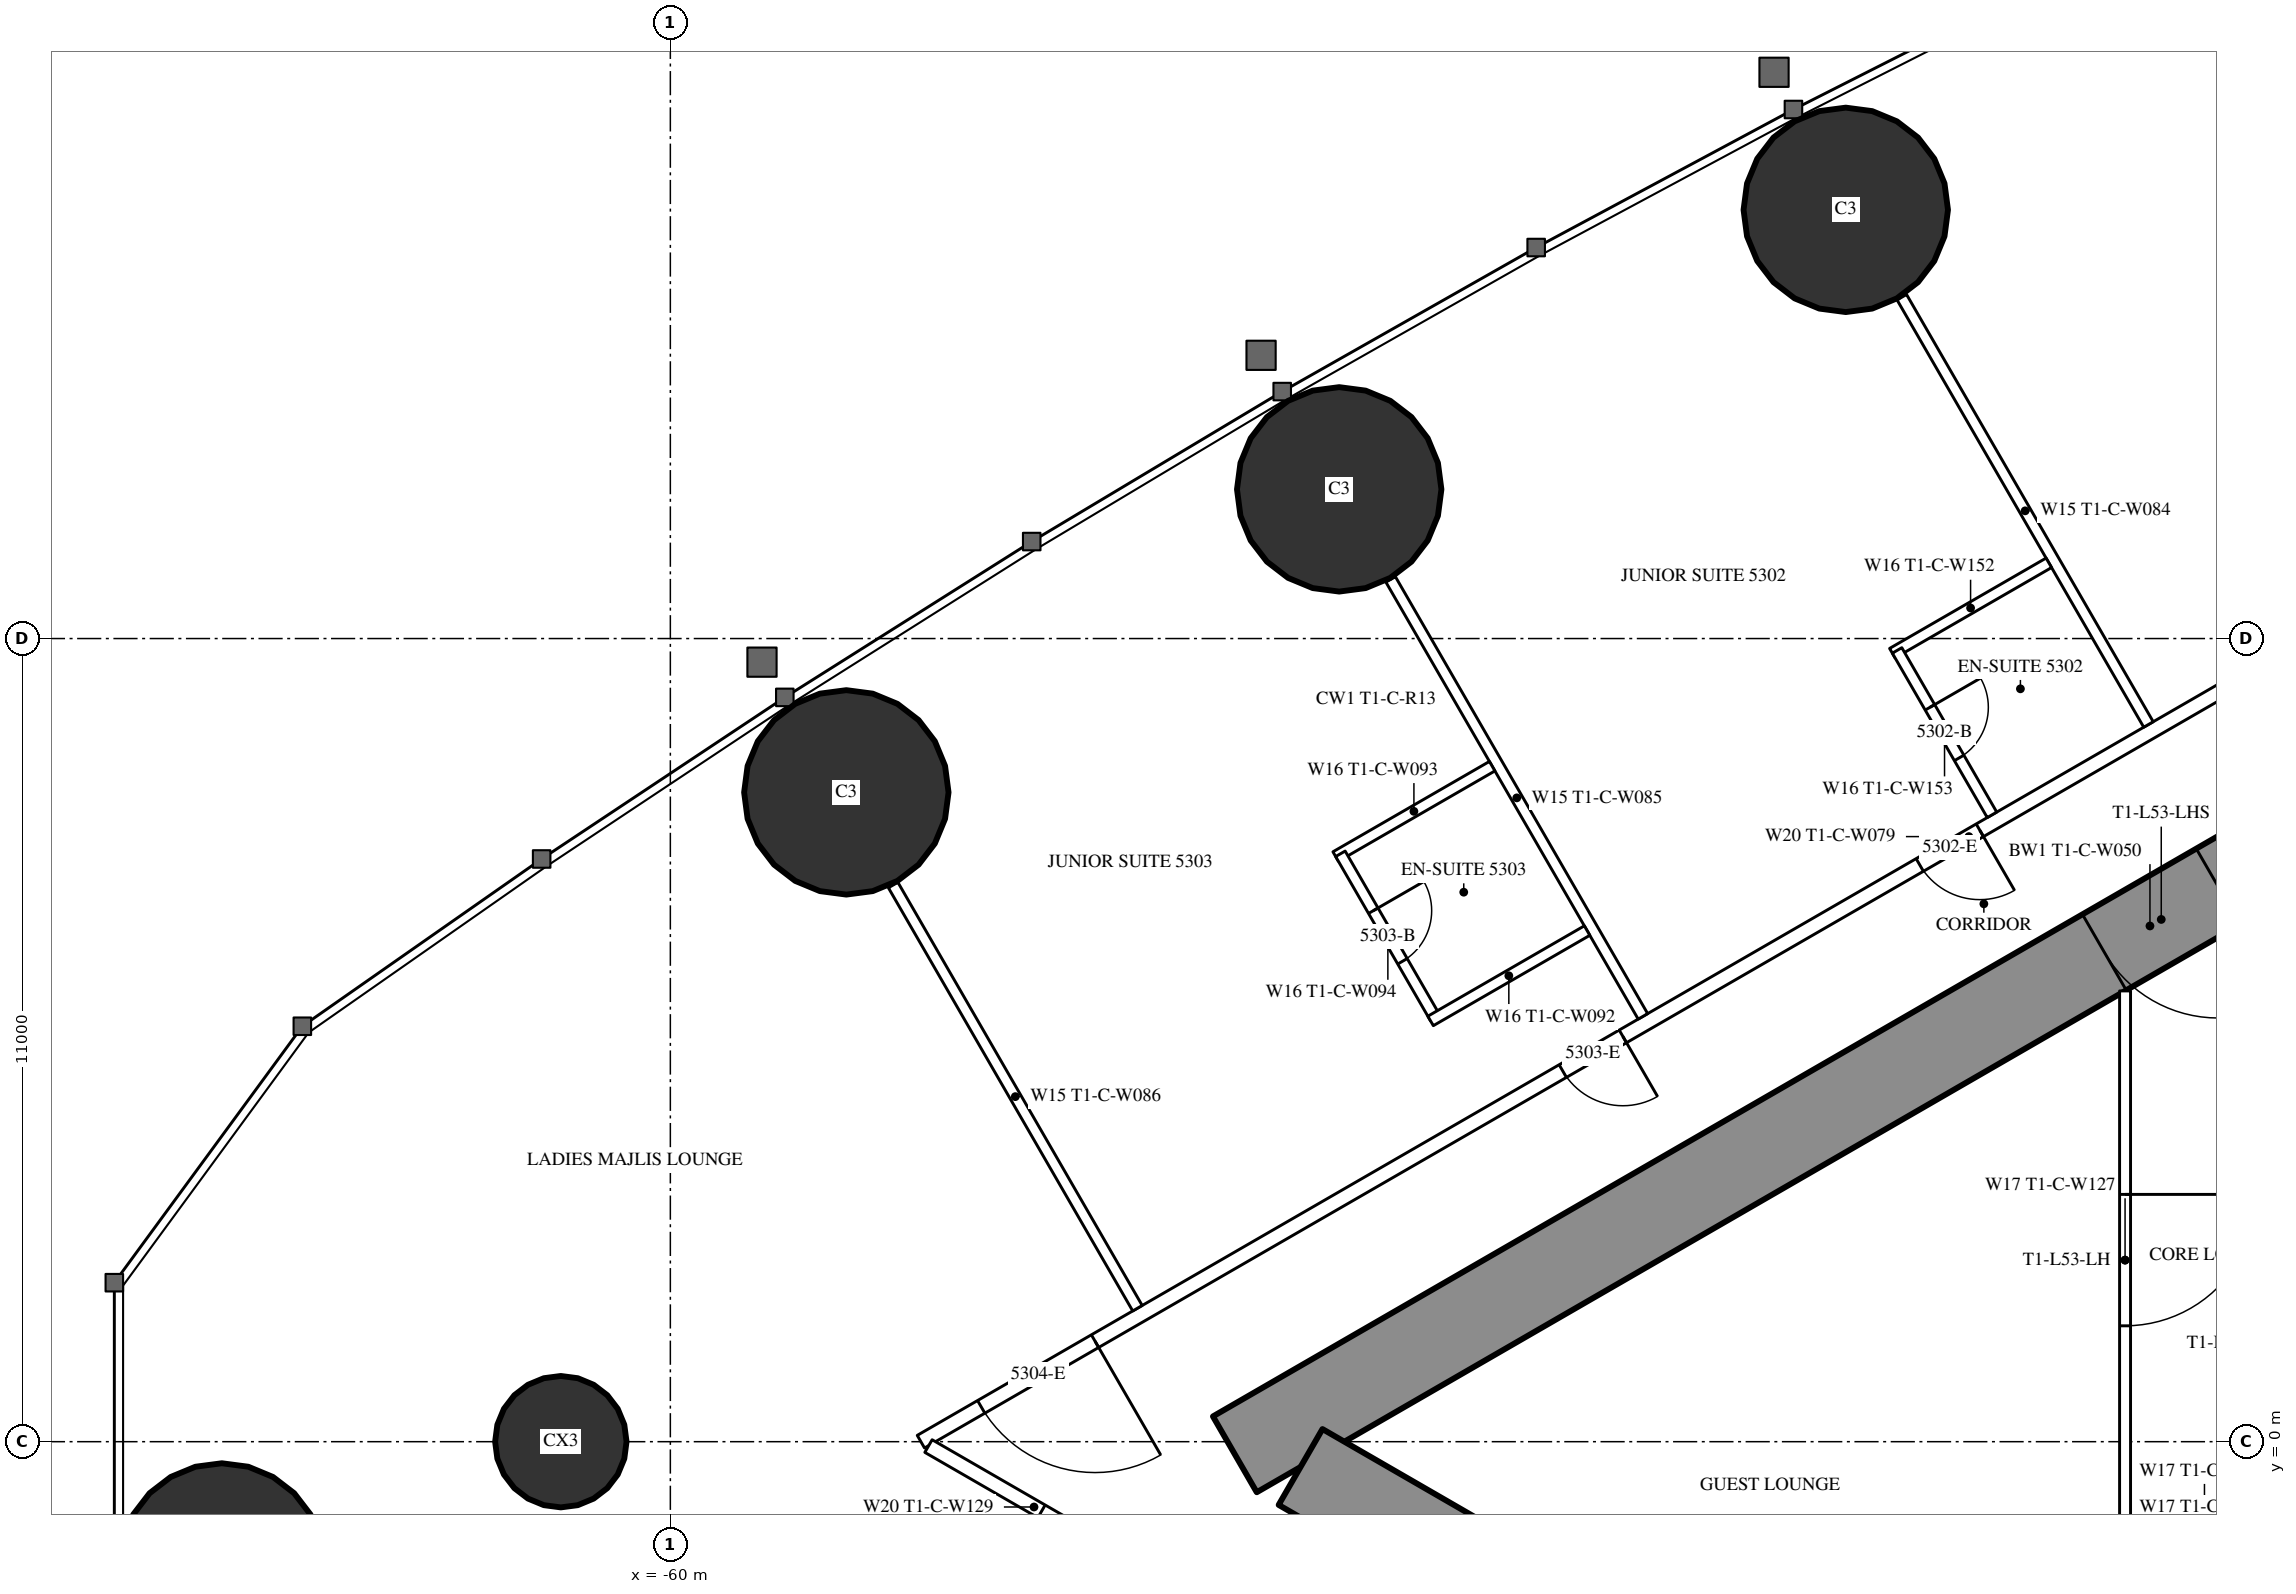
"""IFC4 building model, lengths in metres.
Left out: names, types, materials, properties, quantities, classifications, styles, units other than length and angle.
Written with IfcOpenShell. Run it as: python <this file> out.ifc"""

import sys

from ifc_helpers import new_model, si_unit, direction, frame, frame_2d, origin, origin_2d, place, context, subcontext, project, spatial, rectangle, circle, extrude, element, fill, save


model = new_model("IFC4")
c1 = context("Model", 3, precision=1e-05, world=origin(), true_north=direction((0.0, 1.0)))
c2 = subcontext(c1, "Body", "Model", "MODEL_VIEW")
j1 = project(units=[si_unit("LENGTHUNIT", "METRE"), si_unit("PLANEANGLEUNIT", "RADIAN")], contexts=[c1])
p1 = place(None, origin())
s1 = spatial("IfcSite", under=j1, at=p1, CompositionType="ELEMENT")
p2 = place(p1, origin())
s2 = spatial("IfcBuilding", under=s1, at=p2, CompositionType="ELEMENT")
p3 = place(p2, frame((0.0, 0.0, 198.3)))
s3 = spatial("IfcBuildingStorey", under=s2, at=p3, CompositionType="ELEMENT", Elevation=198.3)
for number, where, z_axis, x_axis in (
    (1, (-66.143, -1.695, 0.0), (0.0, 0.0, 1.0), (1.0, 0.0, 0.0)),
    (2, (-43.9, 16.871, 0.0), (0.0, 0.0, 1.0), (1.0, 0.0, 0.0)),
    (3, (-50.839, 13.043, 0.0), (0.0, 0.0, 1.0), (1.0, 0.0, 0.0)),
    (4, (-57.59, 8.893, 0.0), (0.0, 0.0, 1.0), (1.0, 0.0, 0.0)),
):
    element("IfcColumn", number, at=place(p3, frame(where, z_axis=z_axis, x_axis=x_axis)), inside=s3, PredefinedType="COLUMN", context=c2, shape_type="SweptSolid", body=[
        extrude(circle(Radius=1.4, at=origin_2d()), origin(), (0.0, 0.0, 1.0), 3.5),
    ])
p4 = place(p3, frame((-61.5, 0.0, 0.0), z_axis=(0.0, 0.0, 1.0), x_axis=(1.0, 0.0, 0.0)))
e5 = element("IfcColumn", 5, at=p4, inside=s3, PredefinedType="COLUMN", context=c2, shape_type="SweptSolid", body=[
    extrude(circle(Radius=0.9, at=origin_2d()), origin(), (0.0, 0.0, 1.0), 3.5),
])
p5 = place(p3, frame((-27.2, 14.3, 0.0), z_axis=(0.0, 0.0, 1.0), x_axis=(-0.866026593062, -0.499997940104, 0.0)))
e6 = element("IfcWall", 6, at=p5, inside=s3, PredefinedType="SHEAR", context=c2, shape_type="SweptSolid", body=[
    extrude(rectangle(XDim=28.946, YDim=1.2, at=frame_2d((14.473, 0.0))), origin(), (0.0, 0.0, 1.0), 3.5),
])
p6 = place(p5, frame((4.6, 0.0, 0.0)))
e7 = element("IfcOpeningElement", 7, at=p6, cuts=e6, PredefinedType="OPENING", context=c2, shape_type="SweptSolid", body=[
    extrude(rectangle(XDim=1.0, YDim=2.2, at=frame_2d((0.5, 1.1))), frame((0.0, 0.61, 0.0), z_axis=(0.0, -1.0, 0.0), x_axis=(1.0, 0.0, 0.0)), (0.0, 0.0, 1.0), 1.22),
])
p7 = place(p5, frame((13.395, 0.0, 0.0)))
e8 = element("IfcOpeningElement", 8, at=p7, cuts=e6, PredefinedType="OPENING", context=c2, shape_type="SweptSolid", body=[
    extrude(rectangle(XDim=1.8, YDim=2.2, at=frame_2d((0.9, 1.1))), frame((0.0, 0.61, 0.0), z_axis=(0.0, -1.0, 0.0), x_axis=(1.0, 0.0, 0.0)), (0.0, 0.0, 1.0), 1.22),
])
p8 = place(p3, frame((-27.2, -14.3, 0.0), z_axis=(0.0, 0.0, 1.0), x_axis=(-0.866024021859, 0.500002393557, 0.0)))
e9 = element("IfcWall", 9, at=p8, inside=s3, PredefinedType="SHEAR", context=c2, shape_type="SweptSolid", body=[
    extrude(rectangle(XDim=27.907, YDim=1.2, at=frame_2d((13.954, 0.0))), origin(), (0.0, 0.0, 1.0), 3.5),
])
p9 = place(p8, frame((4.6, 0.0, 0.0)))
e10 = element("IfcOpeningElement", 10, at=p9, cuts=e9, PredefinedType="OPENING", context=c2, shape_type="SweptSolid", body=[
    extrude(rectangle(XDim=1.0, YDim=2.2, at=frame_2d((0.5, 1.1))), frame((0.0, 0.61, 0.0), z_axis=(0.0, -1.0, 0.0), x_axis=(1.0, 0.0, 0.0)), (0.0, 0.0, 1.0), 1.22),
])
p10 = place(p8, frame((13.395, 0.0, 0.0)))
e11 = element("IfcOpeningElement", 11, at=p10, cuts=e9, PredefinedType="OPENING", context=c2, shape_type="SweptSolid", body=[
    extrude(rectangle(XDim=1.8, YDim=2.2, at=frame_2d((0.9, 1.1))), frame((0.0, 0.61, 0.0), z_axis=(0.0, -1.0, 0.0), x_axis=(1.0, 0.0, 0.0)), (0.0, 0.0, 1.0), 1.22),
])
p11 = place(p3, frame((-27.86, 16.575, 0.0), z_axis=(0.0, 0.0, 1.0), x_axis=(-0.866025533911, -0.499999774615, 0.0)))
e12 = element("IfcWall", 12, at=p11, inside=s3, PredefinedType="PARTITIONING", context=c2, shape_type="SweptSolid", body=[
    extrude(rectangle(XDim=33.149, YDim=0.2, at=frame_2d((16.575, 0.0))), origin(), (0.0, 0.0, 1.0), 3.25),
])
p12 = place(p11, frame((3.75, 0.0, 0.0)))
e13 = element("IfcOpeningElement", 13, at=p12, cuts=e12, PredefinedType="OPENING", context=c2, shape_type="SweptSolid", body=[
    extrude(rectangle(XDim=1.0, YDim=2.2, at=frame_2d((0.5, 1.1))), frame((0.0, 0.11, 0.0), z_axis=(0.0, -1.0, 0.0), x_axis=(1.0, 0.0, 0.0)), (0.0, 0.0, 1.0), 0.22),
])
p13 = place(p11, frame((16.402, 0.0, 0.0)))
e14 = element("IfcOpeningElement", 14, at=p13, cuts=e12, PredefinedType="OPENING", context=c2, shape_type="SweptSolid", body=[
    extrude(rectangle(XDim=0.95, YDim=2.2, at=frame_2d((0.475, 1.1))), frame((0.0, 0.11, 0.0), z_axis=(0.0, -1.0, 0.0), x_axis=(1.0, 0.0, 0.0)), (0.0, 0.0, 1.0), 0.22),
])
p14 = place(p11, frame((22.047, 0.0, 0.0)))
e15 = element("IfcOpeningElement", 15, at=p14, cuts=e12, PredefinedType="OPENING", context=c2, shape_type="SweptSolid", body=[
    extrude(rectangle(XDim=0.95, YDim=2.2, at=frame_2d((0.475, 1.1))), frame((0.0, 0.11, 0.0), z_axis=(0.0, -1.0, 0.0), x_axis=(1.0, 0.0, 0.0)), (0.0, 0.0, 1.0), 0.22),
])
p15 = place(p11, frame((30.396, 0.0, 0.0)))
e16 = element("IfcOpeningElement", 16, at=p15, cuts=e12, PredefinedType="OPENING", context=c2, shape_type="SweptSolid", body=[
    extrude(rectangle(XDim=1.8, YDim=2.2, at=frame_2d((0.9, 1.1))), frame((0.0, 0.11, 0.0), z_axis=(0.0, -1.0, 0.0), x_axis=(1.0, 0.0, 0.0)), (0.0, 0.0, 1.0), 0.22),
])
p16 = place(p3, frame((-39.754, 9.823, 0.0), z_axis=(0.0, 0.0, 1.0), x_axis=(-0.499997670926, 0.866026748472, 0.0)))
e17 = element("IfcWall", 17, at=p16, inside=s3, PredefinedType="PARTITIONING", context=c2, shape_type="SweptSolid", body=[
    extrude(rectangle(XDim=6.757, YDim=0.15, at=frame_2d((3.379, 0.0))), origin(), (0.0, 0.0, 1.0), 2.3),
])
p17 = place(p3, frame((-46.679, 5.825, 0.0), z_axis=(0.0, 0.0, 1.0), x_axis=(-0.500006839597, 0.866021454905, 0.0)))
e18 = element("IfcWall", 18, at=p17, inside=s3, PredefinedType="PARTITIONING", context=c2, shape_type="SweptSolid", body=[
    extrude(rectangle(XDim=6.911, YDim=0.15, at=frame_2d((3.456, 0.0))), origin(), (0.0, 0.0, 1.0), 2.3),
])
p18 = place(p3, frame((-53.602, 1.828, 0.0), z_axis=(0.0, 0.0, 1.0), x_axis=(-0.49999191814, 0.866030069798, 0.0)))
e19 = element("IfcWall", 19, at=p18, inside=s3, PredefinedType="PARTITIONING", context=c2, shape_type="SweptSolid", body=[
    extrude(rectangle(XDim=6.692, YDim=0.15, at=frame_2d((3.346, 0.0))), origin(), (0.0, 0.0, 1.0), 2.3),
])
p19 = place(p3, frame((-53.574, -1.729, 0.0), z_axis=(0.0, 0.0, 1.0), x_axis=(-0.866019930389, 0.500009480079, 0.0)))
e20 = element("IfcWall", 20, at=p19, inside=s3, PredefinedType="PARTITIONING", context=c2, shape_type="SweptSolid", body=[
    extrude(rectangle(XDim=3.338, YDim=0.2, at=frame_2d((1.669, 0.0))), origin(), (0.0, 0.0, 1.0), 3.25),
])
p20 = place(p19, frame((0.6, 0.0, 0.0)))
e21 = element("IfcOpeningElement", 21, at=p20, cuts=e20, PredefinedType="OPENING", context=c2, shape_type="SweptSolid", body=[
    extrude(rectangle(XDim=0.95, YDim=2.2, at=frame_2d((0.475, 1.1))), frame((0.0, 0.11, 0.0), z_axis=(0.0, -1.0, 0.0), x_axis=(1.0, 0.0, 0.0)), (0.0, 0.0, 1.0), 0.22),
])
p21 = place(p3, frame((-41.119, 12.037, 0.0), z_axis=(0.0, 0.0, 1.0), x_axis=(-0.866073894602, -0.499916002032, 0.0)))
e22 = element("IfcWall", 22, at=p21, inside=s3, PredefinedType="PARTITIONING", context=c2, shape_type="SweptSolid", body=[
    extrude(rectangle(XDim=2.475, YDim=0.15, at=frame_2d((1.238, 0.0))), origin(), (0.0, 0.0, 1.0), 3.25),
])
p22 = place(p3, frame((-41.898, 8.585, 0.0), z_axis=(0.0, 0.0, 1.0), x_axis=(-0.500006934395, 0.866021400173, 0.0)))
e23 = element("IfcWall", 23, at=p22, inside=s3, PredefinedType="PARTITIONING", context=c2, shape_type="SweptSolid", body=[
    extrude(rectangle(XDim=2.6, YDim=0.15, at=frame_2d((1.3, 0.0))), origin(), (0.0, 0.0, 1.0), 3.25),
])
p23 = place(p22, frame((0.9, 0.0, 0.0)))
e24 = element("IfcOpeningElement", 24, at=p23, cuts=e23, PredefinedType="OPENING", context=c2, shape_type="SweptSolid", body=[
    extrude(rectangle(XDim=0.8, YDim=2.2, at=frame_2d((0.4, 1.1))), frame((0.0, 0.085, 0.0), z_axis=(0.0, -1.0, 0.0), x_axis=(1.0, 0.0, 0.0)), (0.0, 0.0, 1.0), 0.17),
])
p24 = place(p3, frame((-48.744, 9.252, 0.0), z_axis=(0.0, 0.0, 1.0), x_axis=(-0.866006523861, -0.500032699561, 0.0)))
e25 = element("IfcWall", 25, at=p24, inside=s3, PredefinedType="PARTITIONING", context=c2, shape_type="SweptSolid", body=[
    extrude(rectangle(XDim=2.475, YDim=0.15, at=frame_2d((1.237, 0.0))), origin(), (0.0, 0.0, 1.0), 3.25),
])
p25 = place(p3, frame((-49.522, 5.8, 0.0), z_axis=(0.0, 0.0, 1.0), x_axis=(-0.500006934395, 0.866021400173, 0.0)))
e26 = element("IfcWall", 26, at=p25, inside=s3, PredefinedType="PARTITIONING", context=c2, shape_type="SweptSolid", body=[
    extrude(rectangle(XDim=2.6, YDim=0.15, at=frame_2d((1.3, 0.0))), origin(), (0.0, 0.0, 1.0), 3.25),
])
p26 = place(p25, frame((0.9, 0.0, 0.0)))
e27 = element("IfcOpeningElement", 27, at=p26, cuts=e26, PredefinedType="OPENING", context=c2, shape_type="SweptSolid", body=[
    extrude(rectangle(XDim=0.8, YDim=2.2, at=frame_2d((0.4, 1.1))), frame((0.0, 0.085, 0.0), z_axis=(0.0, -1.0, 0.0), x_axis=(1.0, 0.0, 0.0)), (0.0, 0.0, 1.0), 0.17),
])
p27 = place(p3, frame((-47.444, 7.0, 0.0), z_axis=(0.0, 0.0, 1.0), x_axis=(-0.866006523861, -0.500032699561, 0.0)))
e28 = element("IfcWall", 28, at=p27, inside=s3, PredefinedType="PARTITIONING", context=c2, shape_type="SweptSolid", body=[
    extrude(rectangle(XDim=2.475, YDim=0.15, at=frame_2d((1.237, 0.0))), origin(), (0.0, 0.0, 1.0), 3.25),
])
p28 = place(p3, frame((-40.075, 6.174, 0.0), z_axis=(0.0, 0.0, 1.0), x_axis=(0.0, -1.0, 0.0)))
e29 = element("IfcWall", 29, at=p28, inside=s3, PredefinedType="PARTITIONING", context=c2, shape_type="SweptSolid", body=[
    extrude(rectangle(XDim=7.374, YDim=0.15, at=frame_2d((3.687, 0.0))), origin(), (0.0, 0.0, 1.0), 3.25),
])
p29 = place(p28, frame((2.787, 0.0, 0.0)))
e30 = element("IfcOpeningElement", 30, at=p29, cuts=e29, PredefinedType="OPENING", context=c2, shape_type="SweptSolid", body=[
    extrude(rectangle(XDim=1.8, YDim=2.2, at=frame_2d((0.9, 1.1))), frame((0.0, 0.085, 0.0), z_axis=(0.0, -1.0, 0.0), x_axis=(1.0, 0.0, 0.0)), (0.0, 0.0, 1.0), 0.17),
])
p30 = place(p23, origin())
e31 = element("IfcDoor", 31, at=p30, inside=s3, OperationType="SINGLE_SWING_RIGHT", PredefinedType="DOOR", context=c2, shape_type="SweptSolid", body=[
    extrude(rectangle(XDim=0.8, YDim=2.2, at=frame_2d((0.4, 1.1))), frame((0.0, 0.025, 0.0), z_axis=(0.0, -1.0, 0.0), x_axis=(1.0, 0.0, 0.0)), (0.0, 0.0, 1.0), 0.05),
])
fill(e24, e31)
p31 = place(p13, origin())
e32 = element("IfcDoor", 32, at=p31, inside=s3, OperationType="SINGLE_SWING_LEFT", PredefinedType="DOOR", context=c2, shape_type="SweptSolid", body=[
    extrude(rectangle(XDim=0.95, YDim=2.2, at=frame_2d((0.475, 1.1))), frame((0.0, 0.025, 0.0), z_axis=(0.0, -1.0, 0.0), x_axis=(1.0, 0.0, 0.0)), (0.0, 0.0, 1.0), 0.05),
])
fill(e14, e32)
p32 = place(p26, origin())
e33 = element("IfcDoor", 33, at=p32, inside=s3, OperationType="SINGLE_SWING_RIGHT", PredefinedType="DOOR", context=c2, shape_type="SweptSolid", body=[
    extrude(rectangle(XDim=0.8, YDim=2.2, at=frame_2d((0.4, 1.1))), frame((0.0, 0.025, 0.0), z_axis=(0.0, -1.0, 0.0), x_axis=(1.0, 0.0, 0.0)), (0.0, 0.0, 1.0), 0.05),
])
fill(e27, e33)
p33 = place(p14, origin())
e34 = element("IfcDoor", 34, at=p33, inside=s3, OperationType="SINGLE_SWING_LEFT", PredefinedType="DOOR", context=c2, shape_type="SweptSolid", body=[
    extrude(rectangle(XDim=0.95, YDim=2.2, at=frame_2d((0.475, 1.1))), frame((0.0, 0.025, 0.0), z_axis=(0.0, -1.0, 0.0), x_axis=(1.0, 0.0, 0.0)), (0.0, 0.0, 1.0), 0.05),
])
fill(e15, e34)
p34 = place(p15, origin())
e35 = element("IfcDoor", 35, at=p34, inside=s3, OperationType="DOUBLE_DOOR_SINGLE_SWING", PredefinedType="DOOR", context=c2, shape_type="SweptSolid", body=[
    extrude(rectangle(XDim=1.8, YDim=2.2, at=frame_2d((0.9, 1.1))), frame((0.0, 0.025, 0.0), z_axis=(0.0, -1.0, 0.0), x_axis=(1.0, 0.0, 0.0)), (0.0, 0.0, 1.0), 0.05),
])
fill(e16, e35)
p35 = place(p20, origin())
e36 = element("IfcDoor", 36, at=p35, inside=s3, OperationType="SINGLE_SWING_LEFT", PredefinedType="DOOR", context=c2, shape_type="SweptSolid", body=[
    extrude(rectangle(XDim=0.95, YDim=2.2, at=frame_2d((0.475, 1.1))), frame((0.0, 0.025, 0.0), z_axis=(0.0, -1.0, 0.0), x_axis=(1.0, 0.0, 0.0)), (0.0, 0.0, 1.0), 0.05),
])
fill(e21, e36)
p36 = place(p29, origin())
e37 = element("IfcDoor", 37, at=p36, inside=s3, OperationType="DOUBLE_DOOR_SINGLE_SWING", PredefinedType="DOOR", context=c2, shape_type="SweptSolid", body=[
    extrude(rectangle(XDim=1.8, YDim=2.2, at=frame_2d((0.9, 1.1))), frame((0.0, 0.025, 0.0), z_axis=(0.0, -1.0, 0.0), x_axis=(1.0, 0.0, 0.0)), (0.0, 0.0, 1.0), 0.05),
])
fill(e30, e37)
p37 = place(p7, origin())
e38 = element("IfcDoor", 38, at=p37, inside=s3, OperationType="DOUBLE_DOOR_SINGLE_SWING", PredefinedType="DOOR", context=c2, shape_type="SweptSolid", body=[
    extrude(rectangle(XDim=1.8, YDim=2.2, at=frame_2d((0.9, 1.1))), frame((0.0, 0.025, 0.0), z_axis=(0.0, -1.0, 0.0), x_axis=(1.0, 0.0, 0.0)), (0.0, 0.0, 1.0), 0.05),
])
fill(e8, e38)
save(model, sys.argv[1])
